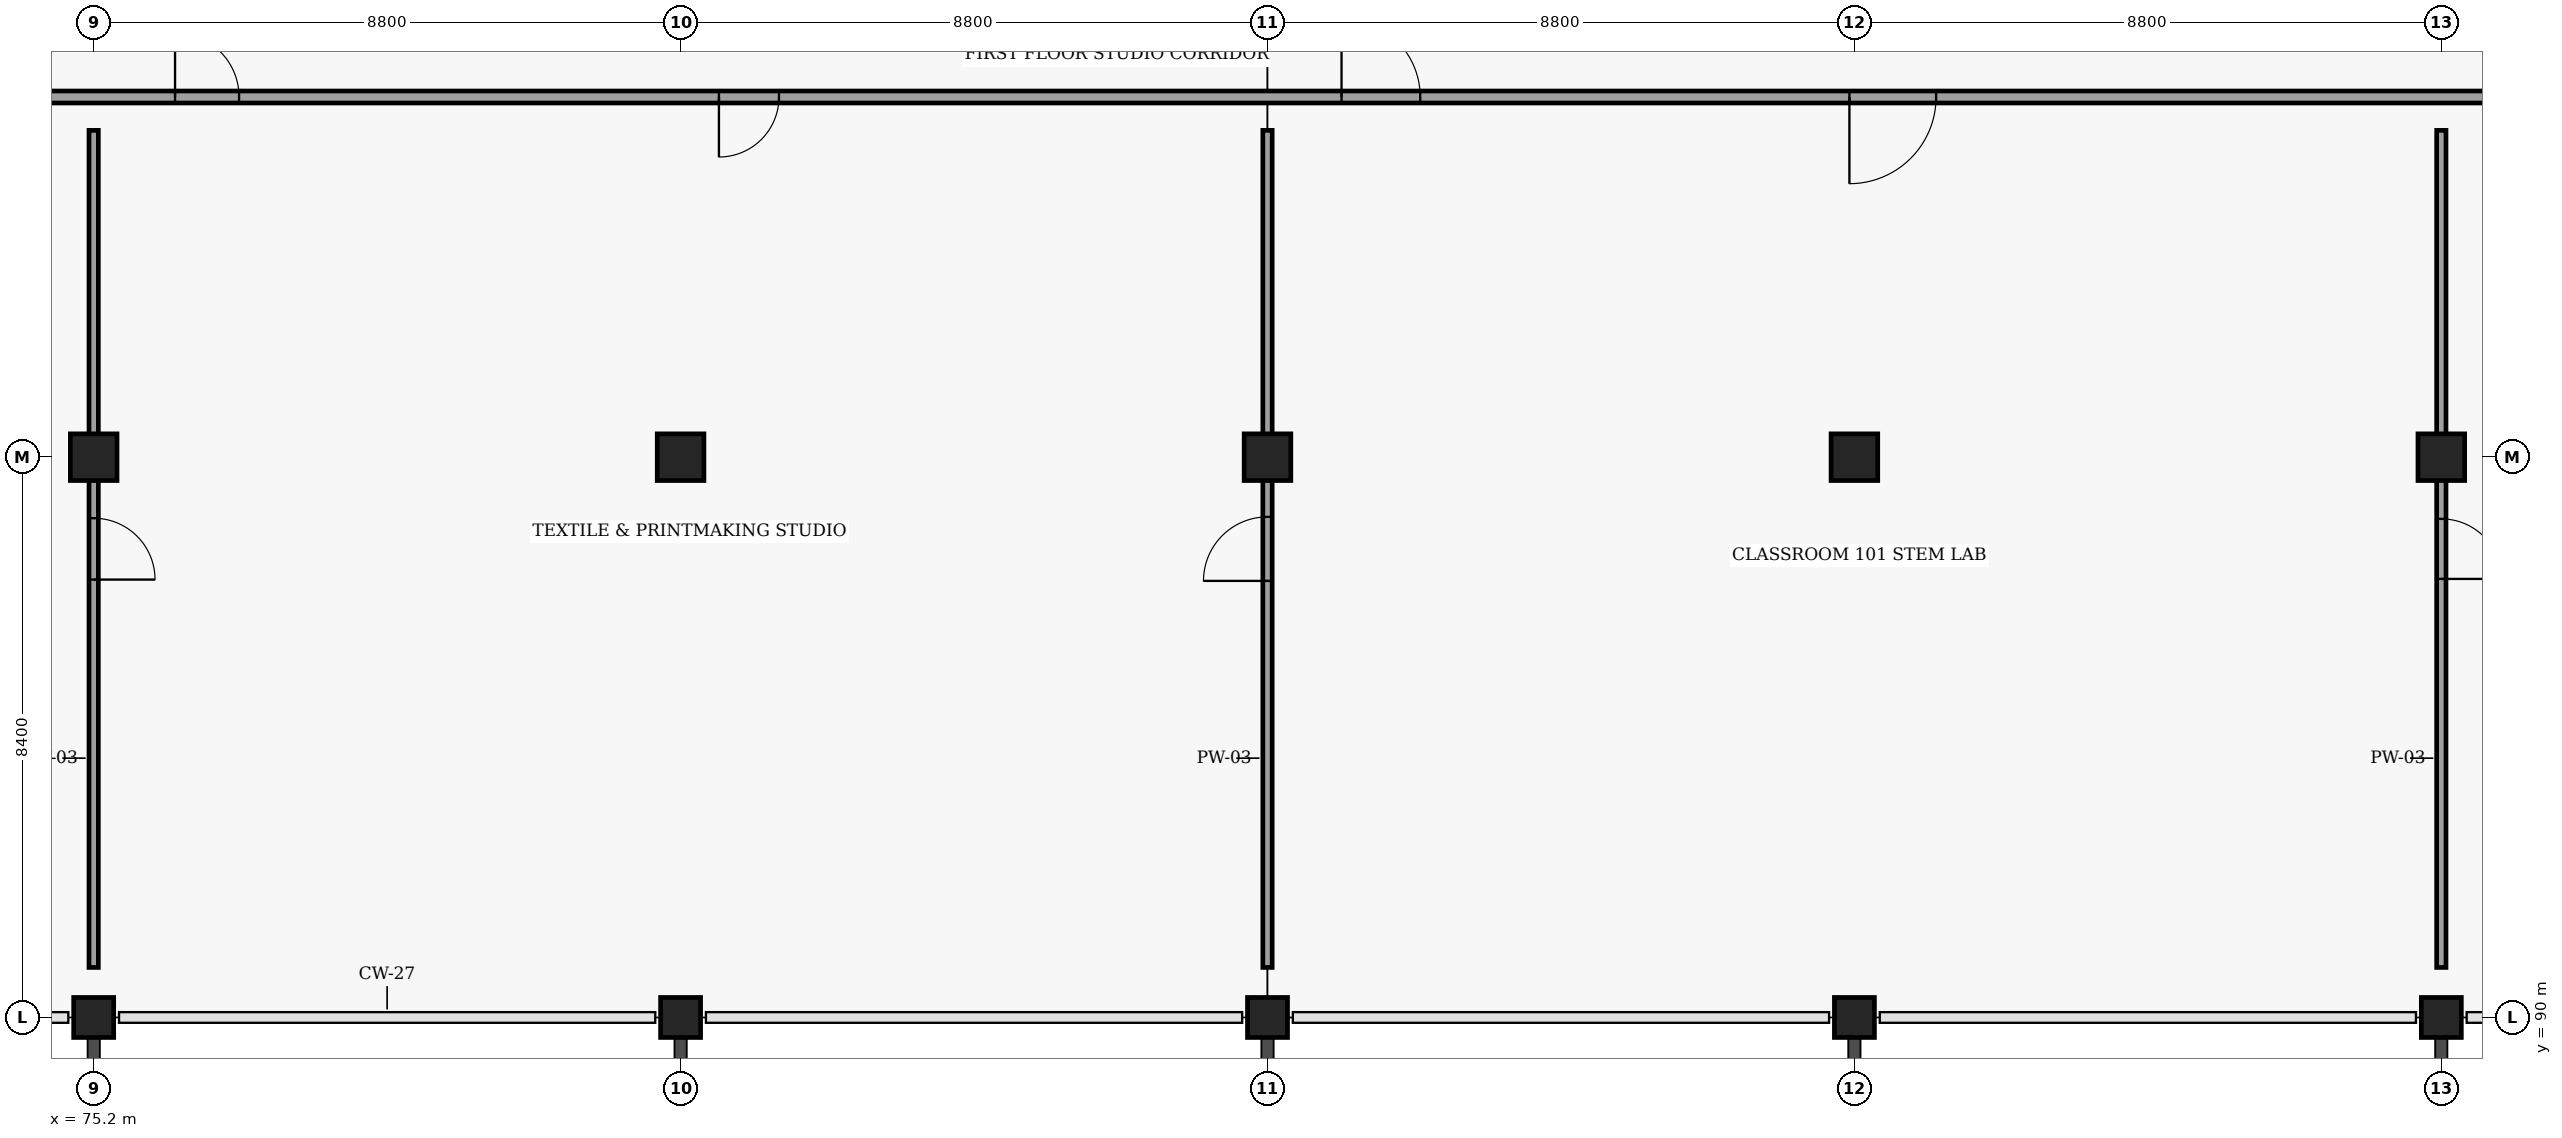
"""IFC4 building model, lengths in metres.
Left out: names, types, materials, properties, quantities, classifications, styles, units other than length and angle.
Written with IfcOpenShell. Run it as: python <this file> out.ifc"""

import sys

from ifc_helpers import new_model, si_unit, direction, frame, frame_2d, origin, origin_2d, place, context, subcontext, project, spatial, rectangle, extrude, element, fill, save


model = new_model("IFC4")
c1 = context("Model", 3, precision=1e-05, world=origin(), true_north=direction((0.0, 1.0)))
c2 = subcontext(c1, "Body", "Model", "MODEL_VIEW")
j1 = project(units=[si_unit("LENGTHUNIT", "METRE"), si_unit("PLANEANGLEUNIT", "RADIAN")], contexts=[c1])
p1 = place(None, origin())
s1 = spatial("IfcSite", under=j1, at=p1, CompositionType="ELEMENT")
p2 = place(p1, origin())
s2 = spatial("IfcBuilding", under=s1, at=p2, CompositionType="ELEMENT")
p3 = place(p2, frame((0.0, 0.0, 4.8)))
s3 = spatial("IfcBuildingStorey", under=s2, at=p3, CompositionType="ELEMENT", Elevation=4.8)
p4 = place(p3, frame((75.2, 90.0, 0.0), z_axis=(0.0, 0.0, 1.0), x_axis=(1.0, 0.0, 0.0)))
e1 = element("IfcColumn", 1, at=p4, inside=s3, PredefinedType="COLUMN", context=c2, shape_type="SweptSolid", body=[
    extrude(rectangle(XDim=0.6, YDim=0.6, at=origin_2d()), origin(), (0.0, 0.0, 1.0), 4.2),
])
p5 = place(p3, frame((75.2, 98.4, 0.0), z_axis=(0.0, 0.0, 1.0), x_axis=(1.0, 0.0, 0.0)))
e2 = element("IfcColumn", 2, at=p5, inside=s3, PredefinedType="COLUMN", context=c2, shape_type="SweptSolid", body=[
    extrude(rectangle(XDim=0.7, YDim=0.7, at=origin_2d()), origin(), (0.0, 0.0, 1.0), 4.2),
])
p6 = place(p3, frame((84.0, 90.0, 0.0), z_axis=(0.0, 0.0, 1.0), x_axis=(1.0, 0.0, 0.0)))
e3 = element("IfcColumn", 3, at=p6, inside=s3, PredefinedType="COLUMN", context=c2, shape_type="SweptSolid", body=[
    extrude(rectangle(XDim=0.6, YDim=0.6, at=origin_2d()), origin(), (0.0, 0.0, 1.0), 4.2),
])
p7 = place(p3, frame((84.0, 98.4, 0.0), z_axis=(0.0, 0.0, 1.0), x_axis=(1.0, 0.0, 0.0)))
e4 = element("IfcColumn", 4, at=p7, inside=s3, PredefinedType="COLUMN", context=c2, shape_type="SweptSolid", body=[
    extrude(rectangle(XDim=0.7, YDim=0.7, at=origin_2d()), origin(), (0.0, 0.0, 1.0), 4.2),
])
p8 = place(p3, frame((92.8, 90.0, 0.0), z_axis=(0.0, 0.0, 1.0), x_axis=(1.0, 0.0, 0.0)))
e5 = element("IfcColumn", 5, at=p8, inside=s3, PredefinedType="COLUMN", context=c2, shape_type="SweptSolid", body=[
    extrude(rectangle(XDim=0.6, YDim=0.6, at=origin_2d()), origin(), (0.0, 0.0, 1.0), 4.2),
])
p9 = place(p3, frame((92.8, 98.4, 0.0), z_axis=(0.0, 0.0, 1.0), x_axis=(1.0, 0.0, 0.0)))
e6 = element("IfcColumn", 6, at=p9, inside=s3, PredefinedType="COLUMN", context=c2, shape_type="SweptSolid", body=[
    extrude(rectangle(XDim=0.7, YDim=0.7, at=origin_2d()), origin(), (0.0, 0.0, 1.0), 4.2),
])
p10 = place(p3, frame((101.6, 90.0, 0.0), z_axis=(0.0, 0.0, 1.0), x_axis=(1.0, 0.0, 0.0)))
e7 = element("IfcColumn", 7, at=p10, inside=s3, PredefinedType="COLUMN", context=c2, shape_type="SweptSolid", body=[
    extrude(rectangle(XDim=0.6, YDim=0.6, at=origin_2d()), origin(), (0.0, 0.0, 1.0), 4.2),
])
p11 = place(p3, frame((101.6, 98.4, 0.0), z_axis=(0.0, 0.0, 1.0), x_axis=(1.0, 0.0, 0.0)))
e8 = element("IfcColumn", 8, at=p11, inside=s3, PredefinedType="COLUMN", context=c2, shape_type="SweptSolid", body=[
    extrude(rectangle(XDim=0.7, YDim=0.7, at=origin_2d()), origin(), (0.0, 0.0, 1.0), 4.2),
])
p12 = place(p3, frame((110.4, 90.0, 0.0), z_axis=(0.0, 0.0, 1.0), x_axis=(1.0, 0.0, 0.0)))
e9 = element("IfcColumn", 9, at=p12, inside=s3, PredefinedType="COLUMN", context=c2, shape_type="SweptSolid", body=[
    extrude(rectangle(XDim=0.6, YDim=0.6, at=origin_2d()), origin(), (0.0, 0.0, 1.0), 4.2),
])
p13 = place(p3, frame((110.4, 98.4, 0.0), z_axis=(0.0, 0.0, 1.0), x_axis=(1.0, 0.0, 0.0)))
e10 = element("IfcColumn", 10, at=p13, inside=s3, PredefinedType="COLUMN", context=c2, shape_type="SweptSolid", body=[
    extrude(rectangle(XDim=0.7, YDim=0.7, at=origin_2d()), origin(), (0.0, 0.0, 1.0), 4.2),
])
p14 = place(p3, frame((42.15, 103.8, 0.0), z_axis=(0.0, 0.0, 1.0), x_axis=(1.0, 0.0, 0.0)))
e11 = element("IfcWall", 11, at=p14, inside=s3, PredefinedType="PARTITIONING", context=c2, shape_type="SweptSolid", body=[
    extrude(rectangle(XDim=102.9, YDim=0.18, at=frame_2d((51.45, 0.0))), origin(), (0.0, 0.0, 1.0), 3.094),
])
p15 = place(p14, frame((8.085, 0.0, 0.0)))
e12 = element("IfcOpeningElement", 12, at=p15, cuts=e11, PredefinedType="OPENING", context=c2, shape_type="SweptSolid", body=[
    extrude(rectangle(XDim=0.98, YDim=2.12, at=frame_2d((0.49, 1.06))), frame((0.0, 0.1, 0.0), z_axis=(0.0, -1.0, 0.0), x_axis=(1.0, 0.0, 0.0)), (0.0, 0.0, 1.0), 0.2),
])
p16 = place(p14, frame((17.125, 0.0, 0.0)))
e13 = element("IfcOpeningElement", 13, at=p16, cuts=e11, PredefinedType="OPENING", context=c2, shape_type="SweptSolid", body=[
    extrude(rectangle(XDim=0.95, YDim=2.12, at=frame_2d((0.475, 1.06))), frame((0.0, 0.1, 0.0), z_axis=(0.0, -1.0, 0.0), x_axis=(1.0, 0.0, 0.0)), (0.0, 0.0, 1.0), 0.2),
])
p17 = place(p14, frame((25.265, 0.0, 0.0)))
e14 = element("IfcOpeningElement", 14, at=p17, cuts=e11, PredefinedType="OPENING", context=c2, shape_type="SweptSolid", body=[
    extrude(rectangle(XDim=0.92, YDim=2.1, at=frame_2d((0.46, 1.05))), frame((0.0, 0.1, 0.0), z_axis=(0.0, -1.0, 0.0), x_axis=(1.0, 0.0, 0.0)), (0.0, 0.0, 1.0), 0.2),
])
p18 = place(p14, frame((34.27, 0.0, 0.0)))
e15 = element("IfcOpeningElement", 15, at=p18, cuts=e11, PredefinedType="OPENING", context=c2, shape_type="SweptSolid", body=[
    extrude(rectangle(XDim=0.96, YDim=2.08, at=frame_2d((0.48, 1.04))), frame((0.0, 0.1, 0.0), z_axis=(0.0, -1.0, 0.0), x_axis=(1.0, 0.0, 0.0)), (0.0, 0.0, 1.0), 0.2),
])
p19 = place(p14, frame((42.425, 0.0, 0.0)))
e16 = element("IfcOpeningElement", 16, at=p19, cuts=e11, PredefinedType="OPENING", context=c2, shape_type="SweptSolid", body=[
    extrude(rectangle(XDim=0.9, YDim=2.06, at=frame_2d((0.45, 1.03))), frame((0.0, 0.1, 0.0), z_axis=(0.0, -1.0, 0.0), x_axis=(1.0, 0.0, 0.0)), (0.0, 0.0, 1.0), 0.2),
])
p20 = place(p14, frame((51.76, 0.0, 0.0)))
e17 = element("IfcOpeningElement", 17, at=p20, cuts=e11, PredefinedType="OPENING", context=c2, shape_type="SweptSolid", body=[
    extrude(rectangle(XDim=1.18, YDim=2.18, at=frame_2d((0.59, 1.09))), frame((0.0, 0.1, 0.0), z_axis=(0.0, -1.0, 0.0), x_axis=(1.0, 0.0, 0.0)), (0.0, 0.0, 1.0), 0.2),
])
p21 = place(p14, frame((59.375, 0.0, 0.0)))
e18 = element("IfcOpeningElement", 18, at=p21, cuts=e11, PredefinedType="OPENING", context=c2, shape_type="SweptSolid", body=[
    extrude(rectangle(XDim=1.3, YDim=2.2, at=frame_2d((0.65, 1.1))), frame((0.0, 0.1, 0.0), z_axis=(0.0, -1.0, 0.0), x_axis=(1.0, 0.0, 0.0)), (0.0, 0.0, 1.0), 0.2),
])
p22 = place(p14, frame((69.2, 0.0, 0.0)))
e19 = element("IfcOpeningElement", 19, at=p22, cuts=e11, PredefinedType="OPENING", context=c2, shape_type="SweptSolid", body=[
    extrude(rectangle(XDim=1.5, YDim=2.25, at=frame_2d((0.75, 1.125))), frame((0.0, 0.1, 0.0), z_axis=(0.0, -1.0, 0.0), x_axis=(1.0, 0.0, 0.0)), (0.0, 0.0, 1.0), 0.2),
])
p23 = place(p14, frame((76.555, 0.0, 0.0)))
e20 = element("IfcOpeningElement", 20, at=p23, cuts=e11, PredefinedType="OPENING", context=c2, shape_type="SweptSolid", body=[
    extrude(rectangle(XDim=1.24, YDim=2.2, at=frame_2d((0.62, 1.1))), frame((0.0, 0.1, 0.0), z_axis=(0.0, -1.0, 0.0), x_axis=(1.0, 0.0, 0.0)), (0.0, 0.0, 1.0), 0.2),
])
p24 = place(p14, frame((86.87, 0.0, 0.0)))
e21 = element("IfcOpeningElement", 21, at=p24, cuts=e11, PredefinedType="OPENING", context=c2, shape_type="SweptSolid", body=[
    extrude(rectangle(XDim=1.36, YDim=2.22, at=frame_2d((0.68, 1.11))), frame((0.0, 0.1, 0.0), z_axis=(0.0, -1.0, 0.0), x_axis=(1.0, 0.0, 0.0)), (0.0, 0.0, 1.0), 0.2),
])
p25 = place(p14, frame((93.485, 0.0, 0.0)))
e22 = element("IfcOpeningElement", 22, at=p25, cuts=e11, PredefinedType="OPENING", context=c2, shape_type="SweptSolid", body=[
    extrude(rectangle(XDim=1.68, YDim=2.26, at=frame_2d((0.84, 1.13))), frame((0.0, 0.1, 0.0), z_axis=(0.0, -1.0, 0.0), x_axis=(1.0, 0.0, 0.0)), (0.0, 0.0, 1.0), 0.2),
])
p26 = place(p3, frame((75.2, 90.75, 0.0), z_axis=(0.0, 0.0, 1.0), x_axis=(0.0, 1.0, 0.0)))
e23 = element("IfcWall", 23, at=p26, inside=s3, PredefinedType="PARTITIONING", context=c2, shape_type="SweptSolid", body=[
    extrude(rectangle(XDim=12.55, YDim=0.14, at=frame_2d((6.275, 0.0))), origin(), (0.0, 0.0, 1.0), 3.145),
])
p27 = place(p26, frame((5.815, 0.0, 0.0)))
e24 = element("IfcOpeningElement", 24, at=p27, cuts=e23, PredefinedType="OPENING", context=c2, shape_type="SweptSolid", body=[
    extrude(rectangle(XDim=0.92, YDim=2.1, at=frame_2d((0.46, 1.05))), frame((0.0, 0.08, 0.0), z_axis=(0.0, -1.0, 0.0), x_axis=(1.0, 0.0, 0.0)), (0.0, 0.0, 1.0), 0.16),
])
p28 = place(p3, frame((92.8, 90.75, 0.0), z_axis=(0.0, 0.0, 1.0), x_axis=(0.0, 1.0, 0.0)))
e25 = element("IfcWall", 25, at=p28, inside=s3, PredefinedType="PARTITIONING", context=c2, shape_type="SweptSolid", body=[
    extrude(rectangle(XDim=12.55, YDim=0.14, at=frame_2d((6.275, 0.0))), origin(), (0.0, 0.0, 1.0), 3.145),
])
p29 = place(p28, frame((5.795, 0.0, 0.0)))
e26 = element("IfcOpeningElement", 26, at=p29, cuts=e25, PredefinedType="OPENING", context=c2, shape_type="SweptSolid", body=[
    extrude(rectangle(XDim=0.96, YDim=2.08, at=frame_2d((0.48, 1.04))), frame((0.0, 0.08, 0.0), z_axis=(0.0, -1.0, 0.0), x_axis=(1.0, 0.0, 0.0)), (0.0, 0.0, 1.0), 0.16),
])
p30 = place(p3, frame((110.4, 90.75, 0.0), z_axis=(0.0, 0.0, 1.0), x_axis=(0.0, 1.0, 0.0)))
e27 = element("IfcWall", 27, at=p30, inside=s3, PredefinedType="PARTITIONING", context=c2, shape_type="SweptSolid", body=[
    extrude(rectangle(XDim=12.55, YDim=0.14, at=frame_2d((6.275, 0.0))), origin(), (0.0, 0.0, 1.0), 3.145),
])
p31 = place(p30, frame((5.825, 0.0, 0.0)))
e28 = element("IfcOpeningElement", 28, at=p31, cuts=e27, PredefinedType="OPENING", context=c2, shape_type="SweptSolid", body=[
    extrude(rectangle(XDim=0.9, YDim=2.06, at=frame_2d((0.45, 1.03))), frame((0.0, 0.08, 0.0), z_axis=(0.0, -1.0, 0.0), x_axis=(1.0, 0.0, 0.0)), (0.0, 0.0, 1.0), 0.16),
])
p32 = place(p18, origin())
e29 = element("IfcDoor", 29, at=p32, inside=s3, OperationType="SINGLE_SWING_LEFT", PredefinedType="DOOR", context=c2, shape_type="SweptSolid", body=[
    extrude(rectangle(XDim=0.96, YDim=2.08, at=frame_2d((0.48, 1.04))), frame((0.0, 0.025, 0.0), z_axis=(0.0, -1.0, 0.0), x_axis=(1.0, 0.0, 0.0)), (0.0, 0.0, 1.0), 0.05),
])
fill(e15, e29)
p33 = place(p19, origin())
e30 = element("IfcDoor", 30, at=p33, inside=s3, OperationType="SINGLE_SWING_RIGHT", PredefinedType="DOOR", context=c2, shape_type="SweptSolid", body=[
    extrude(rectangle(XDim=0.9, YDim=2.06, at=frame_2d((0.45, 1.03))), frame((0.0, 0.025, 0.0), z_axis=(0.0, -1.0, 0.0), x_axis=(1.0, 0.0, 0.0)), (0.0, 0.0, 1.0), 0.05),
])
fill(e16, e30)
p34 = place(p20, origin())
e31 = element("IfcDoor", 31, at=p34, inside=s3, OperationType="SINGLE_SWING_LEFT", PredefinedType="DOOR", context=c2, shape_type="SweptSolid", body=[
    extrude(rectangle(XDim=1.18, YDim=2.18, at=frame_2d((0.59, 1.09))), frame((0.0, 0.025, 0.0), z_axis=(0.0, -1.0, 0.0), x_axis=(1.0, 0.0, 0.0)), (0.0, 0.0, 1.0), 0.05),
])
fill(e17, e31)
p35 = place(p21, origin())
e32 = element("IfcDoor", 32, at=p35, inside=s3, OperationType="SINGLE_SWING_RIGHT", PredefinedType="DOOR", context=c2, shape_type="SweptSolid", body=[
    extrude(rectangle(XDim=1.3, YDim=2.2, at=frame_2d((0.65, 1.1))), frame((0.0, 0.025, 0.0), z_axis=(0.0, -1.0, 0.0), x_axis=(1.0, 0.0, 0.0)), (0.0, 0.0, 1.0), 0.05),
])
fill(e18, e32)
p36 = place(p27, origin())
e33 = element("IfcDoor", 33, at=p36, inside=s3, OperationType="SINGLE_SWING_RIGHT", PredefinedType="DOOR", context=c2, shape_type="SweptSolid", body=[
    extrude(rectangle(XDim=0.92, YDim=2.1, at=frame_2d((0.46, 1.05))), frame((0.0, 0.025, 0.0), z_axis=(0.0, -1.0, 0.0), x_axis=(1.0, 0.0, 0.0)), (0.0, 0.0, 1.0), 0.05),
])
fill(e24, e33)
p37 = place(p29, origin())
e34 = element("IfcDoor", 34, at=p37, inside=s3, OperationType="SINGLE_SWING_LEFT", PredefinedType="DOOR", context=c2, shape_type="SweptSolid", body=[
    extrude(rectangle(XDim=0.96, YDim=2.08, at=frame_2d((0.48, 1.04))), frame((0.0, 0.025, 0.0), z_axis=(0.0, -1.0, 0.0), x_axis=(1.0, 0.0, 0.0)), (0.0, 0.0, 1.0), 0.05),
])
fill(e26, e34)
p38 = place(p31, origin())
e35 = element("IfcDoor", 35, at=p38, inside=s3, OperationType="SINGLE_SWING_RIGHT", PredefinedType="DOOR", context=c2, shape_type="SweptSolid", body=[
    extrude(rectangle(XDim=0.9, YDim=2.06, at=frame_2d((0.45, 1.03))), frame((0.0, 0.025, 0.0), z_axis=(0.0, -1.0, 0.0), x_axis=(1.0, 0.0, 0.0)), (0.0, 0.0, 1.0), 0.05),
])
fill(e28, e35)
save(model, sys.argv[1])
